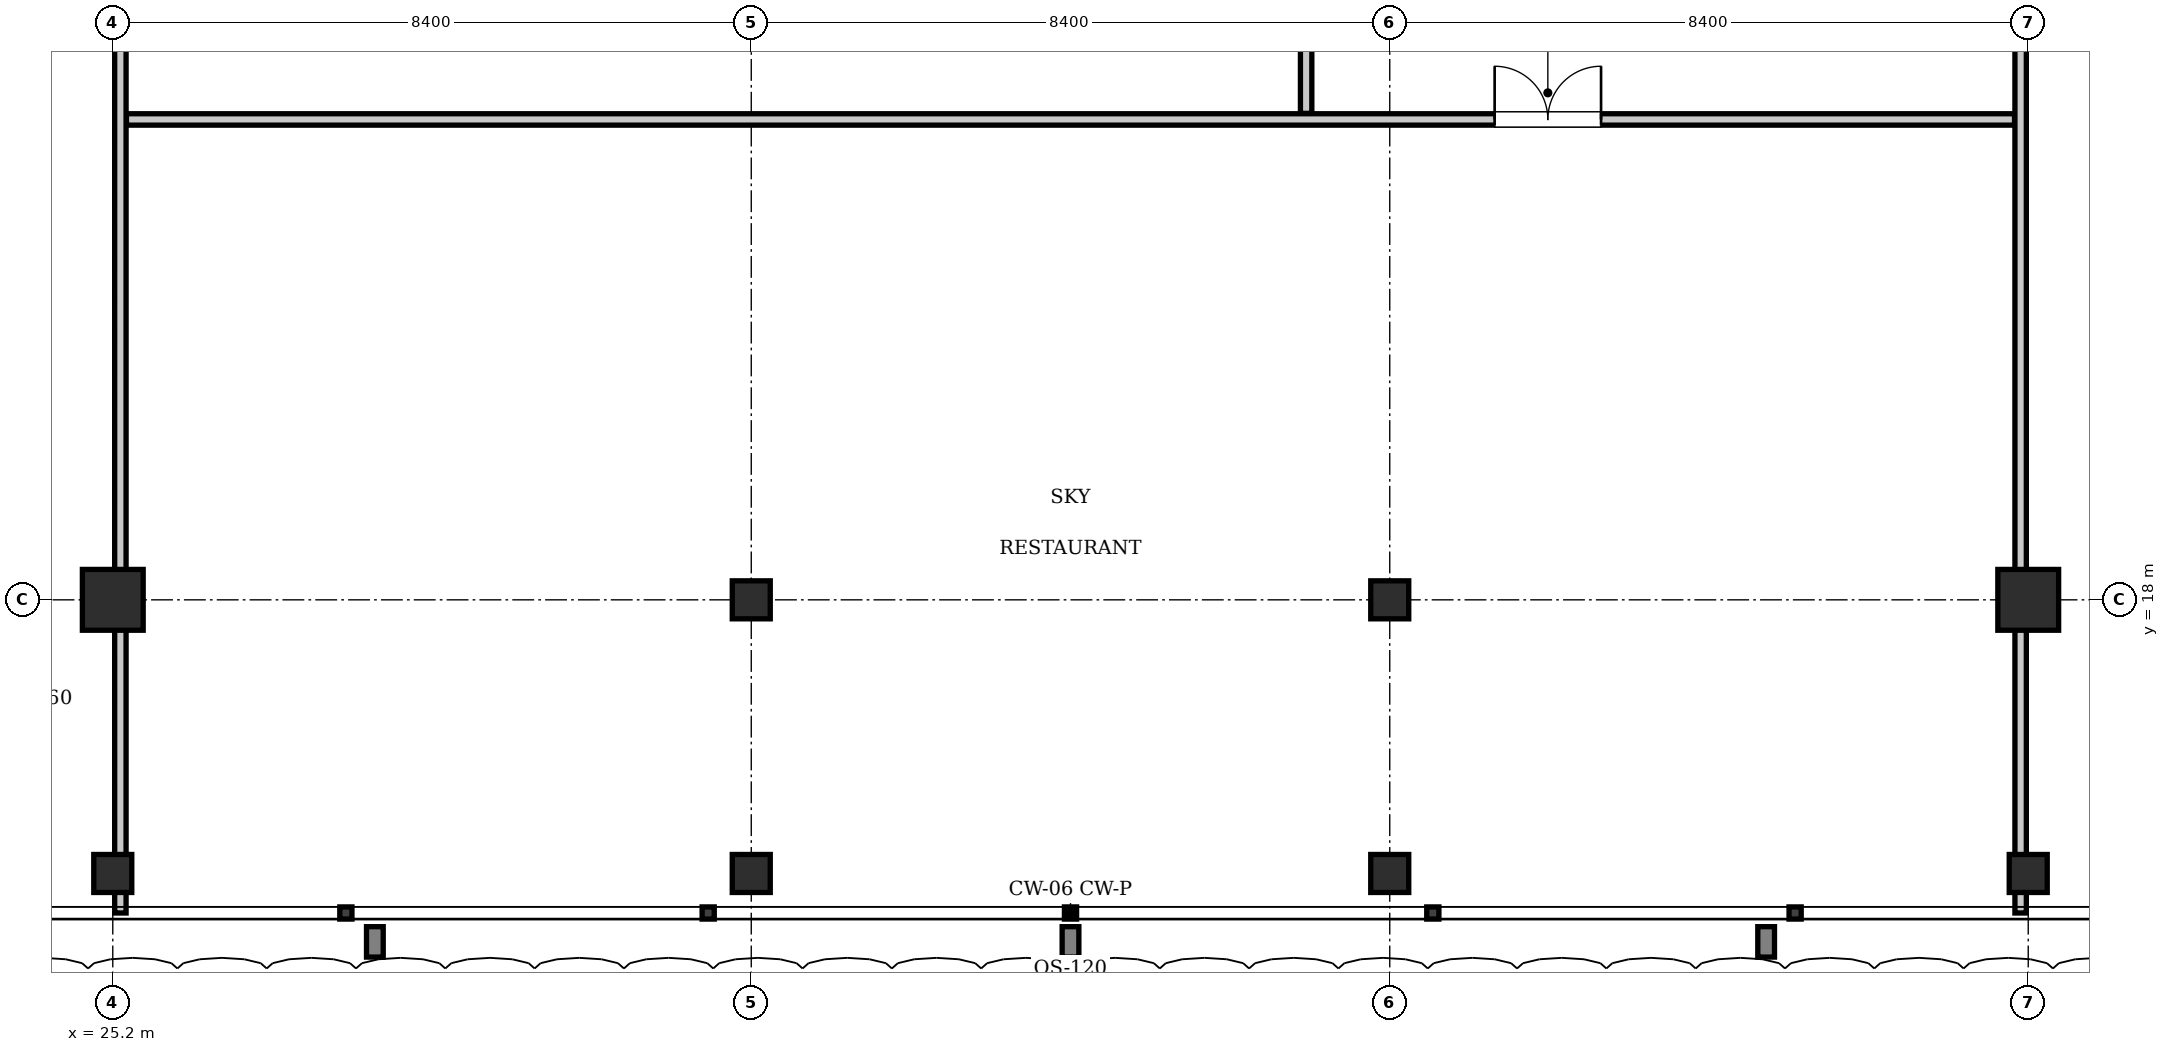
"""IFC4 building model, lengths in metres.
Left out: names, types, materials, properties, quantities, classifications, styles, units other than length and angle.
Written with IfcOpenShell. Run it as: python <this file> out.ifc"""

import sys

from ifc_helpers import new_model, si_unit, direction, frame, frame_2d, origin, origin_2d, place, context, subcontext, project, spatial, rectangle, i_section, extrude, element, fill, save


model = new_model("IFC4")
c1 = context("Model", 3, precision=1e-05, world=origin(), true_north=direction((0.0, 1.0)))
c2 = subcontext(c1, "Body", "Model", "MODEL_VIEW")
j1 = project(units=[si_unit("LENGTHUNIT", "METRE"), si_unit("PLANEANGLEUNIT", "RADIAN")], contexts=[c1])
p1 = place(None, origin())
s1 = spatial("IfcSite", under=j1, at=p1, CompositionType="ELEMENT")
p2 = place(p1, origin())
s2 = spatial("IfcBuilding", under=s1, at=p2, CompositionType="ELEMENT")
p3 = place(p2, frame((0.0, 0.0, 345.1)))
s3 = spatial("IfcBuildingStorey", under=s2, at=p3, CompositionType="ELEMENT", Elevation=345.1)
for number, where, z_axis, x_axis in (
    (1, (25.2, 18.0, 0.0), (0.0, 0.0, 1.0), (1.0, 0.0, 0.0)),
    (2, (50.4, 18.0, 0.0), (0.0, 0.0, 1.0), (1.0, 0.0, 0.0)),
):
    element("IfcColumn", number, at=place(p3, frame(where, z_axis=z_axis, x_axis=x_axis)), inside=s3, PredefinedType="COLUMN", context=c2, shape_type="SweptSolid", body=[
        extrude(rectangle(XDim=0.8, YDim=0.8, at=origin_2d()), origin(), (0.0, 0.0, 1.0), 4.55),
    ])
for number, where, z_axis, x_axis in (
    (3, (33.6, 18.0, 0.0), (0.0, 0.0, 1.0), (1.0, 0.0, 0.0)),
    (4, (42.0, 18.0, 0.0), (0.0, 0.0, 1.0), (1.0, 0.0, 0.0)),
    (5, (25.2, 14.4, 0.0), (0.0, 0.0, 1.0), (1.0, 0.0, 0.0)),
    (6, (33.6, 14.4, 0.0), (0.0, 0.0, 1.0), (1.0, 0.0, 0.0)),
    (7, (42.0, 14.4, 0.0), (0.0, 0.0, 1.0), (1.0, 0.0, 0.0)),
    (8, (50.4, 14.4, 0.0), (0.0, 0.0, 1.0), (1.0, 0.0, 0.0)),
):
    element("IfcColumn", number, at=place(p3, frame(where, z_axis=z_axis, x_axis=x_axis)), inside=s3, PredefinedType="COLUMN", context=c2, shape_type="SweptSolid", body=[
        extrude(i_section(OverallWidth=0.5, OverallDepth=0.5, WebThickness=0.022, FlangeThickness=0.032, at=origin_2d()), origin(), (0.0, 0.0, 1.0), 4.55),
    ])
p4 = place(p3, frame((25.38, 24.32, 0.0), z_axis=(0.0, 0.0, 1.0), x_axis=(1.0, 0.0, 0.0)))
e9 = element("IfcWall", 9, at=p4, inside=s3, PredefinedType="PARTITIONING", context=c2, shape_type="SweptSolid", body=[
    extrude(rectangle(XDim=24.84, YDim=0.15, at=frame_2d((12.42, 0.0))), origin(), (0.0, 0.0, 1.0), 4.31),
])
p5 = place(p4, frame((18.0, 0.0, 0.0)))
e10 = element("IfcOpeningElement", 10, at=p5, cuts=e9, PredefinedType="OPENING", context=c2, shape_type="SweptSolid", body=[
    extrude(rectangle(XDim=1.4, YDim=2.2, at=frame_2d((0.7, 1.1))), frame((0.0, 0.085, 0.0), z_axis=(0.0, -1.0, 0.0), x_axis=(1.0, 0.0, 0.0)), (0.0, 0.0, 1.0), 0.17),
])
p6 = place(p3, frame((40.9, 24.4, 0.0), z_axis=(0.0, 0.0, 1.0), x_axis=(0.0, 1.0, 0.0)))
e11 = element("IfcWall", 11, at=p6, inside=s3, PredefinedType="PARTITIONING", context=c2, shape_type="SweptSolid", body=[
    extrude(rectangle(XDim=8.28, YDim=0.15, at=frame_2d((4.14, 0.0))), origin(), (0.0, 0.0, 1.0), 4.31),
])
for number, where, z_axis, x_axis in (
    (12, (25.3, 13.88, 0.0), (0.0, 0.0, 1.0), (0.0, 1.0, 0.0)),
    (13, (50.3, 13.88, 0.0), (0.0, 0.0, 1.0), (0.0, 1.0, 0.0)),
):
    element("IfcWall", number, at=place(p3, frame(where, z_axis=z_axis, x_axis=x_axis)), inside=s3, PredefinedType="PARTITIONING", context=c2, shape_type="SweptSolid", body=[
        extrude(rectangle(XDim=18.84, YDim=0.15, at=frame_2d((9.42, 0.0))), origin(), (0.0, 0.0, 1.0), 3.841),
    ])
p7 = place(p5, origin())
e14 = element("IfcDoor", 14, at=p7, inside=s3, OperationType="DOUBLE_DOOR_SINGLE_SWING", PredefinedType="DOOR", context=c2, shape_type="SweptSolid", body=[
    extrude(rectangle(XDim=1.4, YDim=2.2, at=frame_2d((0.7, 1.1))), frame((0.0, 0.025, 0.0), z_axis=(0.0, -1.0, 0.0), x_axis=(1.0, 0.0, 0.0)), (0.0, 0.0, 1.0), 0.05),
])
fill(e10, e14)
save(model, sys.argv[1])
